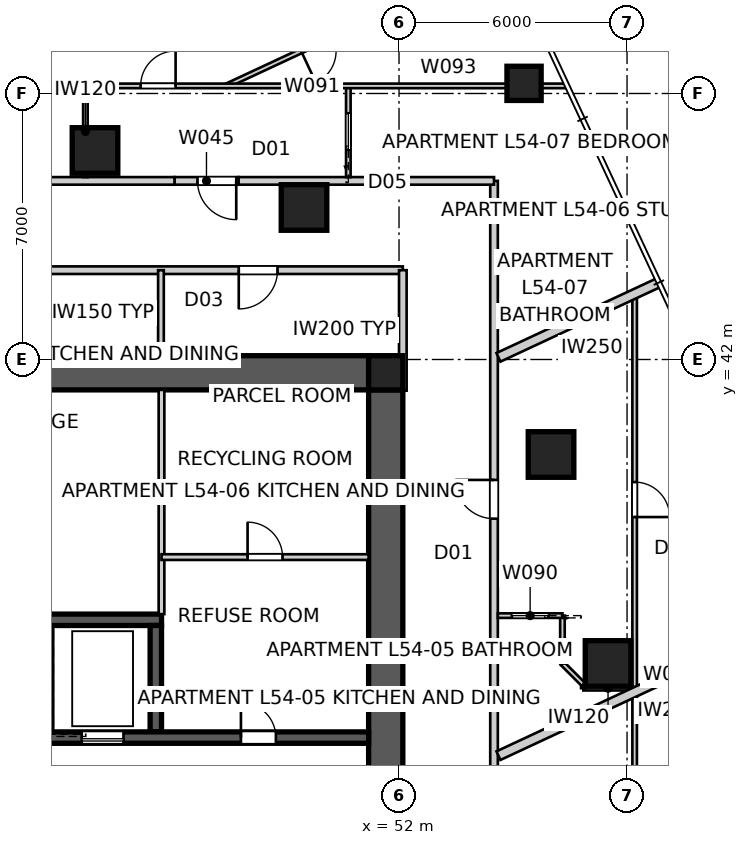
"""IFC4 building model, lengths in metres.
Left out: names, types, materials, properties, quantities, classifications, styles, units other than length and angle.
Written with IfcOpenShell. Run it as: python <this file> out.ifc"""

import sys

from ifc_helpers import new_model, si_unit, direction, frame, frame_2d, origin, origin_2d, place, context, subcontext, project, spatial, polyline, rectangle, outline, extrude, element, fill, save


model = new_model("IFC4")
c1 = context("Model", 3, precision=1e-05, world=origin(), true_north=direction((0.0, 1.0)))
c2 = subcontext(c1, "Body", "Model", "MODEL_VIEW")
j1 = project(units=[si_unit("LENGTHUNIT", "METRE"), si_unit("PLANEANGLEUNIT", "RADIAN")], contexts=[c1])
p1 = place(None, origin())
s1 = spatial("IfcSite", under=j1, at=p1, CompositionType="ELEMENT")
p2 = place(p1, origin())
s2 = spatial("IfcBuilding", under=s1, at=p2, CompositionType="ELEMENT")
p3 = place(p2, frame((0.0, 0.0, 196.4)))
s3 = spatial("IfcBuildingStorey", under=s2, at=p3, CompositionType="ELEMENT", Elevation=196.4)
p4 = place(p3, frame((28.8, 41.65, 0.0), z_axis=(0.0, 0.0, 1.0), x_axis=(1.0, 0.0, 0.0)))
e1 = element("IfcWall", 1, at=p4, inside=s3, PredefinedType="SHEAR", context=c2, shape_type="SweptSolid", body=[
    extrude(outline(polyline([(0.0, -0.45), (22.4, -0.45), (22.4, -0.025), (22.85, -0.025), (22.85, 0.025), (22.4, 0.025), (22.4, 0.45), (0.0, 0.45), (0.0, 0.025), (-0.45, 0.025), (-0.45, -0.025), (0.0, -0.025), (0.0, -0.45)])), origin(), (0.0, 0.0, 1.0), 3.4),
])
p5 = place(p3, frame((51.65, 18.8, 0.0), z_axis=(0.0, 0.0, 1.0), x_axis=(0.0, 1.0, 0.0)))
e2 = element("IfcWall", 2, at=p5, inside=s3, PredefinedType="SHEAR", context=c2, shape_type="SweptSolid", body=[
    extrude(outline(polyline([(0.0, -0.45), (22.4, -0.45), (22.4, -0.025), (22.85, -0.025), (22.85, 0.025), (22.4, 0.025), (22.4, 0.45), (0.0, 0.45), (0.0, 0.025), (-0.45, 0.025), (-0.45, -0.025), (0.0, -0.025), (0.0, -0.45)])), origin(), (0.0, 0.0, 1.0), 3.4),
])
p6 = place(p5, frame((11.14, 0.0, 0.0)))
e3 = element("IfcOpeningElement", 3, at=p6, cuts=e2, PredefinedType="OPENING", context=c2, shape_type="SweptSolid", body=[
    extrude(rectangle(XDim=1.02, YDim=2.4, at=frame_2d((0.51, 1.2))), frame((0.0, 0.46, 0.0), z_axis=(0.0, -1.0, 0.0), x_axis=(1.0, 0.0, 0.0)), (0.0, 0.0, 1.0), 0.92),
])
p7 = place(p3, frame((28.8, 32.05, 0.0), z_axis=(0.0, 0.0, 1.0), x_axis=(1.0, 0.0, 0.0)))
e4 = element("IfcWall", 4, at=p7, inside=s3, PredefinedType="SHEAR", context=c2, shape_type="SweptSolid", body=[
    extrude(rectangle(XDim=22.4, YDim=0.3, at=frame_2d((11.2, 0.0))), origin(), (0.0, 0.0, 1.0), 3.4),
])
p8 = place(p7, frame((19.04, 0.0, 0.0)))
e5 = element("IfcOpeningElement", 5, at=p8, cuts=e4, PredefinedType="OPENING", context=c2, shape_type="SweptSolid", body=[
    extrude(rectangle(XDim=0.92, YDim=2.1, at=frame_2d((0.46, 1.05))), frame((0.0, 0.16, 0.0), z_axis=(0.0, -1.0, 0.0), x_axis=(1.0, 0.0, 0.0)), (0.0, 0.0, 1.0), 0.32),
])
p9 = place(p7, frame((1.265, 0.0, 0.0)))
e6 = element("IfcOpeningElement", 6, at=p9, cuts=e4, PredefinedType="OPENING", context=c2, shape_type="SweptSolid", body=[
    extrude(rectangle(XDim=1.02, YDim=2.1, at=frame_2d((0.51, 1.05))), frame((0.0, 0.16, 0.0), z_axis=(0.0, -1.0, 0.0), x_axis=(1.0, 0.0, 0.0)), (0.0, 0.0, 1.0), 0.32),
])
p10 = place(p7, frame((4.015, 0.0, 0.0)))
e7 = element("IfcOpeningElement", 7, at=p10, cuts=e4, PredefinedType="OPENING", context=c2, shape_type="SweptSolid", body=[
    extrude(rectangle(XDim=0.92, YDim=2.1, at=frame_2d((0.46, 1.05))), frame((0.0, 0.16, 0.0), z_axis=(0.0, -1.0, 0.0), x_axis=(1.0, 0.0, 0.0)), (0.0, 0.0, 1.0), 0.32),
])
p11 = place(p7, frame((6.565, 0.0, 0.0)))
e8 = element("IfcOpeningElement", 8, at=p11, cuts=e4, PredefinedType="OPENING", context=c2, shape_type="SweptSolid", body=[
    extrude(rectangle(XDim=0.92, YDim=2.1, at=frame_2d((0.46, 1.05))), frame((0.0, 0.16, 0.0), z_axis=(0.0, -1.0, 0.0), x_axis=(1.0, 0.0, 0.0)), (0.0, 0.0, 1.0), 0.32),
])
p12 = place(p7, frame((8.89, 0.0, 0.0)))
e9 = element("IfcOpeningElement", 9, at=p12, cuts=e4, PredefinedType="OPENING", context=c2, shape_type="SweptSolid", body=[
    extrude(rectangle(XDim=0.92, YDim=2.1, at=frame_2d((0.46, 1.05))), frame((0.0, 0.16, 0.0), z_axis=(0.0, -1.0, 0.0), x_axis=(1.0, 0.0, 0.0)), (0.0, 0.0, 1.0), 0.32),
])
p13 = place(p7, frame((14.85, 0.0, 0.0)))
e10 = element("IfcOpeningElement", 10, at=p13, cuts=e4, PredefinedType="OPENING", context=c2, shape_type="SweptSolid", body=[
    extrude(rectangle(XDim=1.1, YDim=2.1, at=frame_2d((0.55, 1.05))), frame((0.0, 0.16, 0.0), z_axis=(0.0, -1.0, 0.0), x_axis=(1.0, 0.0, 0.0)), (0.0, 0.0, 1.0), 0.32),
])
p14 = place(p3, frame((34.25, 35.15, 0.0), z_axis=(0.0, 0.0, 1.0), x_axis=(1.0, 0.0, 0.0)))
e11 = element("IfcWall", 11, at=p14, inside=s3, PredefinedType="SHEAR", context=c2, shape_type="SweptSolid", body=[
    extrude(rectangle(XDim=11.5, YDim=0.3, at=frame_2d((5.75, 0.0))), origin(), (0.0, 0.0, 1.0), 3.4),
])
p15 = place(p3, frame((42.8, 32.2, 0.0), z_axis=(0.0, 0.0, 1.0), x_axis=(0.0, 1.0, 0.0)))
e12 = element("IfcWall", 12, at=p15, inside=s3, PredefinedType="SOLIDWALL", context=c2, shape_type="SweptSolid", body=[
    extrude(rectangle(XDim=2.8, YDim=0.2, at=frame_2d((1.4, 0.0))), origin(), (0.0, 0.0, 1.0), 3.4),
])
p16 = place(p3, frame((45.6, 32.2, 0.0), z_axis=(0.0, 0.0, 1.0), x_axis=(0.0, 1.0, 0.0)))
e13 = element("IfcWall", 13, at=p16, inside=s3, PredefinedType="SHEAR", context=c2, shape_type="SweptSolid", body=[
    extrude(rectangle(XDim=2.8, YDim=0.3, at=frame_2d((1.4, 0.0))), origin(), (0.0, 0.0, 1.0), 3.4),
])
for number, where, z_axis, x_axis in (
    (14, (51.65, 41.65, 0.0), (0.0, 0.0, 1.0), (1.0, 0.0, 0.0)),
    (15, (55.29, 49.267, 0.0), (0.0, 0.0, 1.0), (1.0, 0.0, 0.0)),
):
    element("IfcColumn", number, at=place(p3, frame(where, z_axis=z_axis, x_axis=x_axis)), inside=s3, PredefinedType="COLUMN", context=c2, shape_type="SweptSolid", body=[
        extrude(rectangle(XDim=0.9, YDim=0.9, at=origin_2d()), origin(), (0.0, 0.0, 1.0), 3.4),
    ])
for number, where, z_axis, x_axis in (
    (16, (57.5, 34.0, 0.0), (0.0, 0.0, 1.0), (1.0, 0.0, 0.0)),
    (17, (56.0, 39.5, 0.0), (0.0, 0.0, 1.0), (1.0, 0.0, 0.0)),
    (18, (49.5, 46.0, 0.0), (0.0, 0.0, 1.0), (1.0, 0.0, 0.0)),
    (19, (44.0, 47.5, 0.0), (0.0, 0.0, 1.0), (1.0, 0.0, 0.0)),
):
    element("IfcColumn", number, at=place(p3, frame(where, z_axis=z_axis, x_axis=x_axis)), inside=s3, PredefinedType="COLUMN", context=c2, shape_type="SweptSolid", body=[
        extrude(rectangle(XDim=1.2, YDim=1.2, at=origin_2d()), origin(), (0.0, 0.0, 1.0), 3.4),
    ])
p17 = place(p3, frame((54.5, 12.9, 0.0), z_axis=(0.0, 0.0, 1.0), x_axis=(0.0, 1.0, 0.0)))
e20 = element("IfcWall", 20, at=p17, inside=s3, PredefinedType="PARTITIONING", context=c2, shape_type="SweptSolid", body=[
    extrude(rectangle(XDim=33.8, YDim=0.2, at=frame_2d((16.9, 0.0))), origin(), (0.0, 0.0, 1.0), 3.25),
])
p18 = place(p17, frame((24.911, 0.0, 0.0)))
e21 = element("IfcOpeningElement", 21, at=p18, cuts=e20, PredefinedType="OPENING", context=c2, shape_type="SweptSolid", body=[
    extrude(rectangle(XDim=1.02, YDim=2.34, at=frame_2d((0.51, 1.17))), frame((0.0, 0.11, 0.0), z_axis=(0.0, -1.0, 0.0), x_axis=(1.0, 0.0, 0.0)), (0.0, 0.0, 1.0), 0.22),
])
p19 = place(p17, frame((14.759, 0.0, 0.0)))
e22 = element("IfcOpeningElement", 22, at=p19, cuts=e20, PredefinedType="OPENING", context=c2, shape_type="SweptSolid", body=[
    extrude(rectangle(XDim=1.02, YDim=2.34, at=frame_2d((0.51, 1.17))), frame((0.0, 0.11, 0.0), z_axis=(0.0, -1.0, 0.0), x_axis=(1.0, 0.0, 0.0)), (0.0, 0.0, 1.0), 0.22),
])
p20 = place(p3, frame((54.5, 46.7, 0.0), z_axis=(0.0, 0.0, 1.0), x_axis=(-1.0, 0.0, 0.0)))
e23 = element("IfcWall", 23, at=p20, inside=s3, PredefinedType="PARTITIONING", context=c2, shape_type="SweptSolid", body=[
    extrude(rectangle(XDim=6.725, YDim=0.2, at=frame_2d((3.362, 0.0))), origin(), (0.0, 0.0, 1.0), 3.25),
])
p21 = place(p3, frame((47.775, 46.7, 0.0), z_axis=(0.0, 0.0, 1.0), x_axis=(-1.0, 0.0, 0.0)))
e24 = element("IfcWall", 24, at=p21, inside=s3, PredefinedType="PARTITIONING", context=c2, shape_type="SweptSolid", body=[
    extrude(rectangle(XDim=1.684, YDim=0.2, at=frame_2d((0.842, 0.0))), origin(), (0.0, 0.0, 1.0), 2.55),
])
p22 = place(p21, frame((0.058, 0.0, 0.0)))
e25 = element("IfcOpeningElement", 25, at=p22, cuts=e24, PredefinedType="OPENING", context=c2, shape_type="SweptSolid", body=[
    extrude(rectangle(XDim=1.02, YDim=2.34, at=frame_2d((0.51, 1.17))), frame((0.0, 0.11, 0.0), z_axis=(0.0, -1.0, 0.0), x_axis=(1.0, 0.0, 0.0)), (0.0, 0.0, 1.0), 0.22),
])
p23 = place(p3, frame((46.092, 46.7, 0.0), z_axis=(0.0, 0.0, 1.0), x_axis=(-1.0, 0.0, 0.0)))
e26 = element("IfcWall", 26, at=p23, inside=s3, PredefinedType="PARTITIONING", context=c2, shape_type="SweptSolid", body=[
    extrude(rectangle(XDim=12.183, YDim=0.2, at=frame_2d((6.092, 0.0))), origin(), (0.0, 0.0, 1.0), 3.25),
])
p24 = place(p3, frame((62.853, 35.415, 0.0), z_axis=(0.0, 0.0, 1.0), x_axis=(-0.90630664327, -0.422620714548, 0.0)))
e27 = element("IfcWall", 27, at=p24, inside=s3, PredefinedType="PARTITIONING", context=c2, shape_type="SweptSolid", body=[
    extrude(rectangle(XDim=9.088, YDim=0.25, at=frame_2d((4.544, 0.0))), origin(), (0.0, 0.0, 1.0), 3.25),
])
p25 = place(p3, frame((58.838, 44.025, 0.0), z_axis=(0.0, 0.0, 1.0), x_axis=(-0.906317010604, -0.422598481173, 0.0)))
e28 = element("IfcWall", 28, at=p25, inside=s3, PredefinedType="PARTITIONING", context=c2, shape_type="SweptSolid", body=[
    extrude(rectangle(XDim=4.657, YDim=0.25, at=frame_2d((2.329, 0.0))), origin(), (0.0, 0.0, 1.0), 3.25),
])
p26 = place(p3, frame((45.75, 41.2, 0.0), z_axis=(0.0, 0.0, 1.0), x_axis=(0.0, -1.0, 0.0)))
e29 = element("IfcWall", 29, at=p26, inside=s3, PredefinedType="SOLIDWALL", context=c2, shape_type="SweptSolid", body=[
    extrude(rectangle(XDim=5.9, YDim=0.15, at=frame_2d((2.95, 0.0))), origin(), (0.0, 0.0, 1.0), 3.25),
])
p27 = place(p3, frame((45.75, 36.8, 0.0), z_axis=(0.0, 0.0, 1.0), x_axis=(1.0, 0.0, 0.0)))
e30 = element("IfcWall", 30, at=p27, inside=s3, PredefinedType="SOLIDWALL", context=c2, shape_type="SweptSolid", body=[
    extrude(rectangle(XDim=5.45, YDim=0.15, at=frame_2d((2.725, 0.0))), origin(), (0.0, 0.0, 1.0), 3.25),
])
p28 = place(p27, frame((2.265, 0.0, 0.0)))
e31 = element("IfcOpeningElement", 31, at=p28, cuts=e30, PredefinedType="OPENING", context=c2, shape_type="SweptSolid", body=[
    extrude(rectangle(XDim=0.92, YDim=2.1, at=frame_2d((0.46, 1.05))), frame((0.0, 0.085, 0.0), z_axis=(0.0, -1.0, 0.0), x_axis=(1.0, 0.0, 0.0)), (0.0, 0.0, 1.0), 0.17),
])
p29 = place(p3, frame((52.1, 44.35, 0.0), z_axis=(0.0, 0.0, 1.0), x_axis=(-1.0, 0.0, 0.0)))
e32 = element("IfcWall", 32, at=p29, inside=s3, PredefinedType="PARTITIONING", context=c2, shape_type="SweptSolid", body=[
    extrude(rectangle(XDim=24.2, YDim=0.2, at=frame_2d((12.1, 0.0))), origin(), (0.0, 0.0, 1.0), 3.25),
])
p30 = place(p29, frame((10.743, 0.0, 0.0)))
e33 = element("IfcOpeningElement", 33, at=p30, cuts=e32, PredefinedType="OPENING", context=c2, shape_type="SweptSolid", body=[
    extrude(rectangle(XDim=1.02, YDim=2.1, at=frame_2d((0.51, 1.05))), frame((0.0, 0.11, 0.0), z_axis=(0.0, -1.0, 0.0), x_axis=(1.0, 0.0, 0.0)), (0.0, 0.0, 1.0), 0.22),
])
p31 = place(p29, frame((19.636, 0.0, 0.0)))
e34 = element("IfcOpeningElement", 34, at=p31, cuts=e32, PredefinedType="OPENING", context=c2, shape_type="SweptSolid", body=[
    extrude(rectangle(XDim=1.02, YDim=2.1, at=frame_2d((0.51, 1.05))), frame((0.0, 0.11, 0.0), z_axis=(0.0, -1.0, 0.0), x_axis=(1.0, 0.0, 0.0)), (0.0, 0.0, 1.0), 0.22),
])
p32 = place(p29, frame((3.297, 0.0, 0.0)))
e35 = element("IfcOpeningElement", 35, at=p32, cuts=e32, PredefinedType="OPENING", context=c2, shape_type="SweptSolid", body=[
    extrude(rectangle(XDim=1.02, YDim=2.1, at=frame_2d((0.51, 1.05))), frame((0.0, 0.11, 0.0), z_axis=(0.0, -1.0, 0.0), x_axis=(1.0, 0.0, 0.0)), (0.0, 0.0, 1.0), 0.22),
])
p33 = place(p3, frame((52.1, 41.18, 0.0), z_axis=(0.0, 0.0, 1.0), x_axis=(0.0, 1.0, 0.0)))
e36 = element("IfcWall", 36, at=p33, inside=s3, PredefinedType="PARTITIONING", context=c2, shape_type="SweptSolid", body=[
    extrude(rectangle(XDim=3.17, YDim=0.2, at=frame_2d((1.585, 0.0))), origin(), (0.0, 0.0, 1.0), 3.25),
])
p34 = place(p3, frame((45.735, 42.1, 0.0), z_axis=(0.0, 0.0, 1.0), x_axis=(0.0, 1.0, 0.0)))
e37 = element("IfcWall", 37, at=p34, inside=s3, PredefinedType="SOLIDWALL", context=c2, shape_type="SweptSolid", body=[
    extrude(rectangle(XDim=2.25, YDim=0.15, at=frame_2d((1.125, 0.0))), origin(), (0.0, 0.0, 1.0), 2.796),
])
p35 = place(p3, frame((58.2, 43.728, 0.0), z_axis=(0.0, 0.0, 1.0), x_axis=(0.0, -1.0, 0.0)))
e38 = element("IfcWall", 38, at=p35, inside=s3, PredefinedType="PARTITIONING", context=c2, shape_type="SweptSolid", body=[
    extrude(rectangle(XDim=16.528, YDim=0.12, at=frame_2d((8.264, 0.0))), origin(), (0.0, 0.0, 1.0), 3.25),
])
p36 = place(p35, frame((4.954, 0.0, 0.0)))
e39 = element("IfcOpeningElement", 39, at=p36, cuts=e38, PredefinedType="OPENING", context=c2, shape_type="SweptSolid", body=[
    extrude(rectangle(XDim=0.92, YDim=2.34, at=frame_2d((0.46, 1.17))), frame((0.0, 0.07, 0.0), z_axis=(0.0, -1.0, 0.0), x_axis=(1.0, 0.0, 0.0)), (0.0, 0.0, 1.0), 0.14),
])
p37 = place(p35, frame((14.2, 0.0, 0.0)))
e40 = element("IfcOpeningElement", 40, at=p37, cuts=e38, PredefinedType="OPENING", context=c2, shape_type="SweptSolid", body=[
    extrude(rectangle(XDim=0.92, YDim=2.34, at=frame_2d((0.46, 1.17))), frame((0.0, 0.07, 0.0), z_axis=(0.0, -1.0, 0.0), x_axis=(1.0, 0.0, 0.0)), (0.0, 0.0, 1.0), 0.14),
])
p38 = place(p3, frame((58.15, 33.35, 0.0), z_axis=(0.0, 0.0, 1.0), x_axis=(-1.0, 0.0, 0.0)))
e41 = element("IfcWall", 41, at=p38, inside=s3, PredefinedType="PARTITIONING", context=c2, shape_type="SweptSolid", body=[
    extrude(rectangle(XDim=1.3, YDim=0.12, at=frame_2d((0.65, 0.0))), origin(), (0.0, 0.0, 1.0), 3.25),
])
p39 = place(p3, frame((56.85, 33.45, 0.0), z_axis=(0.0, 0.0, 1.0), x_axis=(-0.707106781187, 0.707106781187, 0.0)))
e42 = element("IfcWall", 42, at=p39, inside=s3, PredefinedType="PARTITIONING", context=c2, shape_type="SweptSolid", body=[
    extrude(rectangle(XDim=0.778, YDim=0.12, at=frame_2d((0.389, 0.0))), origin(), (0.0, 0.0, 1.0), 3.25),
])
p40 = place(p3, frame((56.3, 34.0, 0.0), z_axis=(0.0, 0.0, 1.0), x_axis=(0.0, 1.0, 0.0)))
e43 = element("IfcWall", 43, at=p40, inside=s3, PredefinedType="PARTITIONING", context=c2, shape_type="SweptSolid", body=[
    extrude(rectangle(XDim=1.26, YDim=0.12, at=frame_2d((0.63, 0.0))), origin(), (0.0, 0.0, 1.0), 3.25),
])
p41 = place(p3, frame((56.3, 35.26, 0.0), z_axis=(0.0, 0.0, 1.0), x_axis=(-1.0, 0.0, 0.0)))
e44 = element("IfcWall", 44, at=p41, inside=s3, PredefinedType="PARTITIONING", context=c2, shape_type="SweptSolid", body=[
    extrude(rectangle(XDim=1.7, YDim=0.12, at=frame_2d((0.85, 0.0))), origin(), (0.0, 0.0, 1.0), 3.25),
])
p42 = place(p41, frame((0.37, 0.0, 0.0)))
e45 = element("IfcOpeningElement", 45, at=p42, cuts=e44, PredefinedType="OPENING", context=c2, shape_type="SweptSolid", body=[
    extrude(rectangle(XDim=0.96, YDim=2.1, at=frame_2d((0.48, 1.05))), frame((0.0, 0.07, 0.0), z_axis=(0.0, -1.0, 0.0), x_axis=(1.0, 0.0, 0.0)), (0.0, 0.0, 1.0), 0.14),
])
p43 = place(p3, frame((50.666, 46.8, 0.0), z_axis=(0.0, 0.0, 1.0), x_axis=(0.0, 1.0, 0.0)))
e46 = element("IfcWall", 46, at=p43, inside=s3, PredefinedType="PARTITIONING", context=c2, shape_type="SweptSolid", body=[
    extrude(rectangle(XDim=2.4, YDim=0.12, at=frame_2d((1.2, 0.0))), origin(), (0.0, 0.0, 1.0), 3.25),
])
p44 = place(p43, frame((0.72, 0.0, 0.0)))
e47 = element("IfcOpeningElement", 47, at=p44, cuts=e46, PredefinedType="OPENING", context=c2, shape_type="SweptSolid", body=[
    extrude(rectangle(XDim=0.96, YDim=2.1, at=frame_2d((0.48, 1.05))), frame((0.0, 0.07, 0.0), z_axis=(0.0, -1.0, 0.0), x_axis=(1.0, 0.0, 0.0)), (0.0, 0.0, 1.0), 0.14),
])
p45 = place(p3, frame((54.787, 52.618, 0.0), z_axis=(0.0, 0.0, 1.0), x_axis=(-0.906311876708, -0.422609491301, 0.0)))
e48 = element("IfcWall", 48, at=p45, inside=s3, PredefinedType="PARTITIONING", context=c2, shape_type="SweptSolid", body=[
    extrude(rectangle(XDim=8.088, YDim=0.12, at=frame_2d((4.044, 0.0))), origin(), (0.0, 0.0, 1.0), 3.25),
])
p46 = place(p45, frame((4.997, 0.0, 0.0)))
e49 = element("IfcOpeningElement", 49, at=p46, cuts=e48, PredefinedType="OPENING", context=c2, shape_type="SweptSolid", body=[
    extrude(rectangle(XDim=0.92, YDim=2.34, at=frame_2d((0.46, 1.17))), frame((0.0, 0.07, 0.0), z_axis=(0.0, -1.0, 0.0), x_axis=(1.0, 0.0, 0.0)), (0.0, 0.0, 1.0), 0.14),
])
p47 = place(p3, frame((31.047, 49.2, 0.0), z_axis=(0.0, 0.0, 1.0), x_axis=(1.0, 0.0, 0.0)))
e50 = element("IfcWall", 50, at=p47, inside=s3, PredefinedType="PARTITIONING", context=c2, shape_type="SweptSolid", body=[
    extrude(rectangle(XDim=25.333, YDim=0.12, at=frame_2d((12.667, 0.0))), origin(), (0.0, 0.0, 1.0), 3.25),
])
p48 = place(p47, frame((14.154, 0.0, 0.0)))
e51 = element("IfcOpeningElement", 51, at=p48, cuts=e50, PredefinedType="OPENING", context=c2, shape_type="SweptSolid", body=[
    extrude(rectangle(XDim=0.92, YDim=2.34, at=frame_2d((0.46, 1.17))), frame((0.0, 0.07, 0.0), z_axis=(0.0, -1.0, 0.0), x_axis=(1.0, 0.0, 0.0)), (0.0, 0.0, 1.0), 0.14),
])
p49 = place(p47, frame((10.24, 0.0, 0.0)))
e52 = element("IfcOpeningElement", 52, at=p49, cuts=e50, PredefinedType="OPENING", context=c2, shape_type="SweptSolid", body=[
    extrude(rectangle(XDim=0.96, YDim=2.1, at=frame_2d((0.48, 1.05))), frame((0.0, 0.07, 0.0), z_axis=(0.0, -1.0, 0.0), x_axis=(1.0, 0.0, 0.0)), (0.0, 0.0, 1.0), 0.14),
])
p50 = place(p47, frame((6.596, 0.0, 0.0)))
e53 = element("IfcOpeningElement", 53, at=p50, cuts=e50, PredefinedType="OPENING", context=c2, shape_type="SweptSolid", body=[
    extrude(rectangle(XDim=0.92, YDim=2.34, at=frame_2d((0.46, 1.17))), frame((0.0, 0.07, 0.0), z_axis=(0.0, -1.0, 0.0), x_axis=(1.0, 0.0, 0.0)), (0.0, 0.0, 1.0), 0.14),
])
p51 = place(p47, frame((2.19, 0.0, 0.0)))
e54 = element("IfcOpeningElement", 54, at=p51, cuts=e50, PredefinedType="OPENING", context=c2, shape_type="SweptSolid", body=[
    extrude(rectangle(XDim=0.96, YDim=2.1, at=frame_2d((0.48, 1.05))), frame((0.0, 0.07, 0.0), z_axis=(0.0, -1.0, 0.0), x_axis=(1.0, 0.0, 0.0)), (0.0, 0.0, 1.0), 0.14),
])
p52 = place(p3, frame((43.748, 46.8, 0.0), z_axis=(0.0, 0.0, 1.0), x_axis=(0.0, 1.0, 0.0)))
e55 = element("IfcWall", 55, at=p52, inside=s3, PredefinedType="PARTITIONING", context=c2, shape_type="SweptSolid", body=[
    extrude(rectangle(XDim=2.4, YDim=0.12, at=frame_2d((1.2, 0.0))), origin(), (0.0, 0.0, 1.0), 3.25),
])
p53 = place(p3, frame((56.85, 33.35, 0.0), z_axis=(0.0, 0.0, 1.0), x_axis=(0.0, 1.0, 0.0)))
e56 = element("IfcWall", 56, at=p53, inside=s3, PredefinedType="PARTITIONING", context=c2, shape_type="SweptSolid", body=[
    extrude(rectangle(XDim=0.1, YDim=0.12, at=frame_2d((0.05, 0.0))), origin(), (0.0, 0.0, 1.0), 3.25),
])
p54 = place(p8, origin())
e57 = element("IfcDoor", 57, at=p54, inside=s3, OperationType="SINGLE_SWING_LEFT", PredefinedType="DOOR", context=c2, shape_type="SweptSolid", body=[
    extrude(rectangle(XDim=0.92, YDim=2.1, at=frame_2d((0.46, 1.05))), frame((0.0, 0.025, 0.0), z_axis=(0.0, -1.0, 0.0), x_axis=(1.0, 0.0, 0.0)), (0.0, 0.0, 1.0), 0.05),
])
fill(e5, e57)
p55 = place(p22, origin())
e58 = element("IfcDoor", 58, at=p55, inside=s3, OperationType="SINGLE_SWING_LEFT", PredefinedType="DOOR", context=c2, shape_type="SweptSolid", body=[
    extrude(rectangle(XDim=1.02, YDim=2.34, at=frame_2d((0.51, 1.17))), frame((0.0, 0.025, 0.0), z_axis=(0.0, -1.0, 0.0), x_axis=(1.0, 0.0, 0.0)), (0.0, 0.0, 1.0), 0.05),
])
fill(e25, e58)
p56 = place(p18, origin())
e59 = element("IfcDoor", 59, at=p56, inside=s3, OperationType="SINGLE_SWING_RIGHT", PredefinedType="DOOR", context=c2, shape_type="SweptSolid", body=[
    extrude(rectangle(XDim=1.02, YDim=2.34, at=frame_2d((0.51, 1.17))), frame((0.0, 0.025, 0.0), z_axis=(0.0, -1.0, 0.0), x_axis=(1.0, 0.0, 0.0)), (0.0, 0.0, 1.0), 0.05),
])
fill(e21, e59)
p57 = place(p32, origin())
e60 = element("IfcDoor", 60, at=p57, inside=s3, OperationType="SINGLE_SWING_RIGHT", PredefinedType="DOOR", context=c2, shape_type="SweptSolid", body=[
    extrude(rectangle(XDim=1.02, YDim=2.1, at=frame_2d((0.51, 1.05))), frame((0.0, 0.025, 0.0), z_axis=(0.0, -1.0, 0.0), x_axis=(1.0, 0.0, 0.0)), (0.0, 0.0, 1.0), 0.05),
])
fill(e35, e60)
p58 = place(p28, origin())
e61 = element("IfcDoor", 61, at=p58, inside=s3, OperationType="SINGLE_SWING_LEFT", PredefinedType="DOOR", context=c2, shape_type="SweptSolid", body=[
    extrude(rectangle(XDim=0.92, YDim=2.1, at=frame_2d((0.46, 1.05))), frame((0.0, 0.025, 0.0), z_axis=(0.0, -1.0, 0.0), x_axis=(1.0, 0.0, 0.0)), (0.0, 0.0, 1.0), 0.05),
])
fill(e31, e61)
p59 = place(p48, origin())
e62 = element("IfcDoor", 62, at=p59, inside=s3, OperationType="SINGLE_SWING_RIGHT", PredefinedType="DOOR", context=c2, shape_type="SweptSolid", body=[
    extrude(rectangle(XDim=0.92, YDim=2.34, at=frame_2d((0.46, 1.17))), frame((0.0, 0.025, 0.0), z_axis=(0.0, -1.0, 0.0), x_axis=(1.0, 0.0, 0.0)), (0.0, 0.0, 1.0), 0.05),
])
fill(e51, e62)
p60 = place(p44, origin())
e63 = element("IfcDoor", 63, at=p60, inside=s3, OperationType="SLIDING_TO_LEFT", PredefinedType="DOOR", context=c2, shape_type="SweptSolid", body=[
    extrude(rectangle(XDim=0.96, YDim=2.1, at=frame_2d((0.48, 1.05))), frame((0.0, 0.025, 0.0), z_axis=(0.0, -1.0, 0.0), x_axis=(1.0, 0.0, 0.0)), (0.0, 0.0, 1.0), 0.05),
])
fill(e47, e63)
p61 = place(p36, origin())
e64 = element("IfcDoor", 64, at=p61, inside=s3, OperationType="SINGLE_SWING_RIGHT", PredefinedType="DOOR", context=c2, shape_type="SweptSolid", body=[
    extrude(rectangle(XDim=0.92, YDim=2.34, at=frame_2d((0.46, 1.17))), frame((0.0, 0.025, 0.0), z_axis=(0.0, -1.0, 0.0), x_axis=(1.0, 0.0, 0.0)), (0.0, 0.0, 1.0), 0.05),
])
fill(e39, e64)
p62 = place(p42, origin())
e65 = element("IfcDoor", 65, at=p62, inside=s3, OperationType="SLIDING_TO_LEFT", PredefinedType="DOOR", context=c2, shape_type="SweptSolid", body=[
    extrude(rectangle(XDim=0.96, YDim=2.1, at=frame_2d((0.48, 1.05))), frame((0.0, 0.025, 0.0), z_axis=(0.0, -1.0, 0.0), x_axis=(1.0, 0.0, 0.0)), (0.0, 0.0, 1.0), 0.05),
])
fill(e45, e65)
p63 = place(p13, origin())
e66 = element("IfcDoor", 66, at=p63, inside=s3, OperationType="SLIDING_TO_LEFT", PredefinedType="DOOR", context=c2, shape_type="SweptSolid", body=[
    extrude(rectangle(XDim=1.1, YDim=2.1, at=frame_2d((0.55, 1.05))), frame((0.0, 0.025, 0.0), z_axis=(0.0, -1.0, 0.0), x_axis=(1.0, 0.0, 0.0)), (0.0, 0.0, 1.0), 0.05),
])
fill(e10, e66)
save(model, sys.argv[1])
